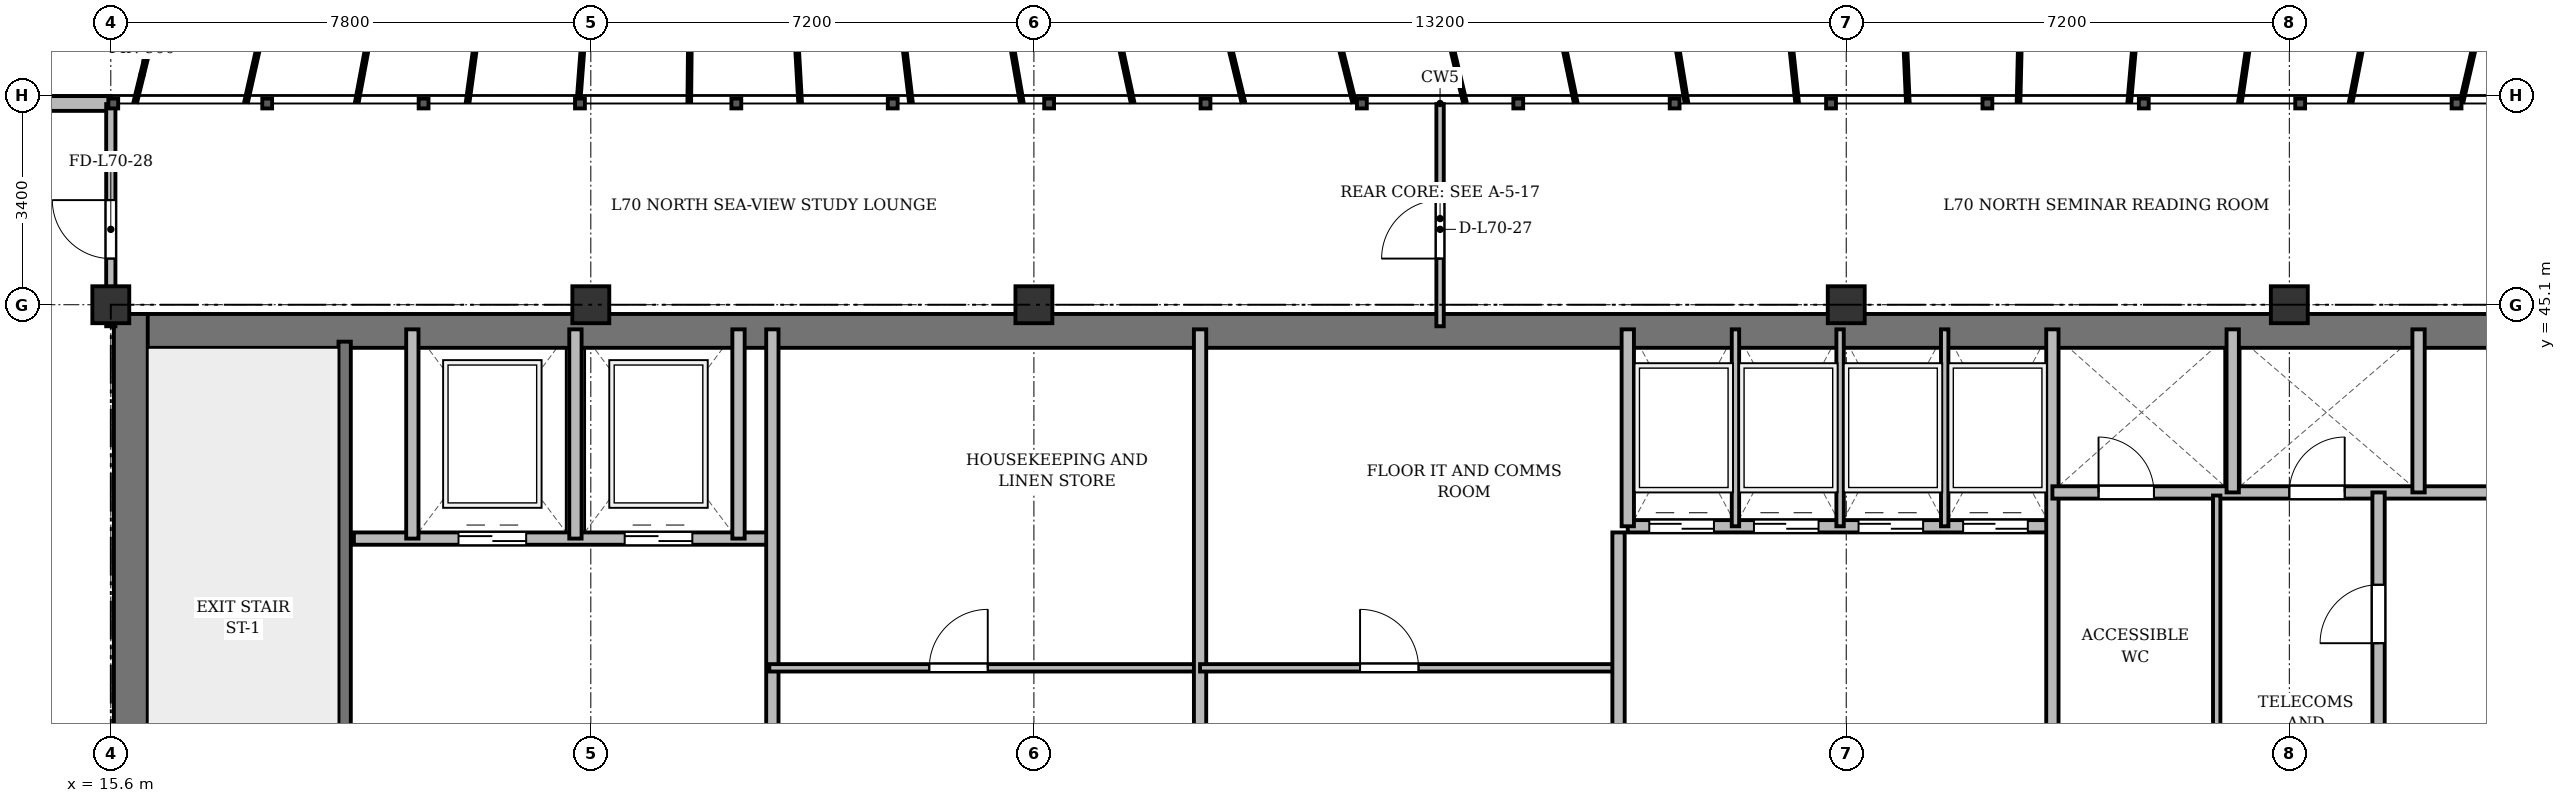
"""IFC4 building model, lengths in metres.
Left out: names, types, materials, properties, quantities, classifications, styles, units other than length and angle.
Written with IfcOpenShell. Run it as: python <this file> out.ifc"""

import sys

from ifc_helpers import new_model, si_unit, direction, frame, frame_2d, origin, origin_2d, place, context, subcontext, project, spatial, rectangle, extrude, source, transform, mapped, element, fill, save


model = new_model("IFC4")
c1 = context("Model", 3, precision=1e-05, world=origin(), true_north=direction((0.0, 1.0)))
c2 = subcontext(c1, "Body", "Model", "MODEL_VIEW")
j1 = project(units=[si_unit("LENGTHUNIT", "METRE"), si_unit("PLANEANGLEUNIT", "RADIAN")], contexts=[c1])
p1 = place(None, origin())
s1 = spatial("IfcSite", under=j1, at=p1, CompositionType="ELEMENT")
p2 = place(p1, origin())
s2 = spatial("IfcBuilding", under=s1, at=p2, CompositionType="ELEMENT")
p3 = place(p2, frame((0.0, 0.0, 270.3)))
s3 = spatial("IfcBuildingStorey", under=s2, at=p3, CompositionType="ELEMENT", Elevation=270.3)
m1 = source(origin(), c2, "Body", "SweptSolid", [
    extrude(rectangle(XDim=0.6, YDim=0.6, at=origin_2d()), origin(), (0.0, 0.0, 1.0), 3.6),
])
for number, where, z_axis, x_axis in (
    (1, (15.6, 45.1, 0.0), (0.0, 0.0, 1.0), (1.0, 0.0, 0.0)),
    (2, (23.4, 45.1, 0.0), (0.0, 0.0, 1.0), (1.0, 0.0, 0.0)),
    (3, (30.6, 45.1, 0.0), (0.0, 0.0, 1.0), (1.0, 0.0, 0.0)),
    (4, (43.8, 45.1, 0.0), (0.0, 0.0, 1.0), (1.0, 0.0, 0.0)),
    (5, (51.0, 45.1, 0.0), (0.0, 0.0, 1.0), (1.0, 0.0, 0.0)),
):
    element("IfcColumn", number, at=place(p3, frame(where, z_axis=z_axis, x_axis=x_axis)), inside=s3, PredefinedType="COLUMN", context=c2, shape_type="MappedRepresentation", body=[
        mapped(m1, transform((0.0, 0.0, 0.0), x_axis=(1.0, 0.0, 0.0), y_axis=(0.0, 1.0, 0.0), z_axis=(0.0, 0.0, 1.0), scale=1.0)),
    ])
p4 = place(p3, frame((11.3, 48.37, 0.0), z_axis=(0.0, 0.0, 1.0), x_axis=(1.0, 0.0, 0.0)))
e6 = element("IfcWall", 6, at=p4, inside=s3, PredefinedType="SOLIDWALL", context=c2, shape_type="SweptSolid", body=[
    extrude(rectangle(XDim=4.3, YDim=0.24, at=frame_2d((2.15, 0.0))), origin(), (0.0, 0.0, 1.0), 3.37),
])
p5 = place(p4, frame((1.46, 0.0, 0.9)))
e7 = element("IfcOpeningElement", 7, at=p5, cuts=e6, PredefinedType="OPENING", context=c2, shape_type="SweptSolid", body=[
    extrude(rectangle(XDim=1.2, YDim=1.65, at=frame_2d((0.6, 0.825))), frame((0.0, 0.13, 0.0), z_axis=(0.0, -1.0, 0.0), x_axis=(1.0, 0.0, 0.0)), (0.0, 0.0, 1.0), 0.26),
])
p6 = place(p3, frame((15.65, 44.675, 0.0), z_axis=(0.0, 0.0, 1.0), x_axis=(1.0, 0.0, 0.0)))
e8 = element("IfcWall", 8, at=p6, inside=s3, PredefinedType="SHEAR", context=c2, shape_type="SweptSolid", body=[
    extrude(rectangle(XDim=43.1, YDim=0.55, at=frame_2d((21.55, 0.0))), origin(), (0.0, 0.0, 1.0), 3.37),
])
p7 = place(p3, frame((15.925, 33.4, 0.0), z_axis=(0.0, 0.0, 1.0), x_axis=(0.0, 1.0, 0.0)))
e9 = element("IfcWall", 9, at=p7, inside=s3, PredefinedType="SHEAR", context=c2, shape_type="SweptSolid", body=[
    extrude(rectangle(XDim=11.55, YDim=0.55, at=frame_2d((5.775, 0.0))), origin(), (0.0, 0.0, 1.0), 3.37),
])
p8 = place(p3, frame((19.4, 33.4, 0.0), z_axis=(0.0, 0.0, 1.0), x_axis=(0.0, 1.0, 0.0)))
e10 = element("IfcWall", 10, at=p8, inside=s3, PredefinedType="SHEAR", context=c2, shape_type="SweptSolid", body=[
    extrude(rectangle(XDim=11.1, YDim=0.2, at=frame_2d((5.55, 0.0))), origin(), (0.0, 0.0, 1.0), 3.37),
])
p9 = place(p8, frame((0.85, 0.0, 0.0)))
e11 = element("IfcOpeningElement", 11, at=p9, cuts=e10, PredefinedType="OPENING", context=c2, shape_type="SweptSolid", body=[
    extrude(rectangle(XDim=1.1, YDim=2.15, at=frame_2d((0.55, 1.075))), frame((0.0, 0.11, 0.0), z_axis=(0.0, -1.0, 0.0), x_axis=(1.0, 0.0, 0.0)), (0.0, 0.0, 1.0), 0.22),
])
p10 = place(p3, frame((19.55, 41.3, 0.0), z_axis=(0.0, 0.0, 1.0), x_axis=(1.0, 0.0, 0.0)))
e12 = element("IfcWall", 12, at=p10, inside=s3, PredefinedType="SOLIDWALL", context=c2, shape_type="SweptSolid", body=[
    extrude(rectangle(XDim=6.75, YDim=0.2, at=frame_2d((3.375, 0.0))), origin(), (0.0, 0.0, 1.0), 3.37),
])
p11 = place(p10, frame((1.7, 0.0, 0.0)))
e13 = element("IfcOpeningElement", 13, at=p11, cuts=e12, PredefinedType="OPENING", context=c2, shape_type="SweptSolid", body=[
    extrude(rectangle(XDim=1.1, YDim=2.15, at=frame_2d((0.55, 1.075))), frame((0.0, 0.11, 0.0), z_axis=(0.0, -1.0, 0.0), x_axis=(1.0, 0.0, 0.0)), (0.0, 0.0, 1.0), 0.22),
])
p12 = place(p10, frame((4.4, 0.0, 0.0)))
e14 = element("IfcOpeningElement", 14, at=p12, cuts=e12, PredefinedType="OPENING", context=c2, shape_type="SweptSolid", body=[
    extrude(rectangle(XDim=1.1, YDim=2.15, at=frame_2d((0.55, 1.075))), frame((0.0, 0.11, 0.0), z_axis=(0.0, -1.0, 0.0), x_axis=(1.0, 0.0, 0.0)), (0.0, 0.0, 1.0), 0.22),
])
for number, where, z_axis, x_axis in (
    (15, (20.5, 41.3, 0.0), (0.0, 0.0, 1.0), (0.0, 1.0, 0.0)),
    (16, (23.15, 41.3, 0.0), (0.0, 0.0, 1.0), (0.0, 1.0, 0.0)),
    (17, (25.8, 41.3, 0.0), (0.0, 0.0, 1.0), (0.0, 1.0, 0.0)),
):
    element("IfcWall", number, at=place(p3, frame(where, z_axis=z_axis, x_axis=x_axis)), inside=s3, PredefinedType="SOLIDWALL", context=c2, shape_type="SweptSolid", body=[
        extrude(rectangle(XDim=3.4, YDim=0.2, at=frame_2d((1.7, 0.0))), origin(), (0.0, 0.0, 1.0), 3.37),
    ])
p13 = place(p3, frame((26.35, 33.4, 0.0), z_axis=(0.0, 0.0, 1.0), x_axis=(0.0, 1.0, 0.0)))
e18 = element("IfcWall", 18, at=p13, inside=s3, PredefinedType="SOLIDWALL", context=c2, shape_type="SweptSolid", body=[
    extrude(rectangle(XDim=11.3, YDim=0.2, at=frame_2d((5.65, 0.0))), origin(), (0.0, 0.0, 1.0), 2.92),
])
p14 = place(p3, frame((26.3, 39.2, 0.0), z_axis=(0.0, 0.0, 1.0), x_axis=(1.0, 0.0, 0.0)))
e19 = element("IfcWall", 19, at=p14, inside=s3, PredefinedType="PARTITIONING", context=c2, shape_type="SweptSolid", body=[
    extrude(rectangle(XDim=7.0, YDim=0.12, at=frame_2d((3.5, 0.0))), origin(), (0.0, 0.0, 1.0), 2.87),
])
p15 = place(p14, frame((2.6, 0.0, 0.0)))
e20 = element("IfcOpeningElement", 20, at=p15, cuts=e19, PredefinedType="OPENING", context=c2, shape_type="SweptSolid", body=[
    extrude(rectangle(XDim=0.95, YDim=2.15, at=frame_2d((0.475, 1.075))), frame((0.0, 0.07, 0.0), z_axis=(0.0, -1.0, 0.0), x_axis=(1.0, 0.0, 0.0)), (0.0, 0.0, 1.0), 0.14),
])
p16 = place(p3, frame((33.3, 33.4, 0.0), z_axis=(0.0, 0.0, 1.0), x_axis=(0.0, 1.0, 0.0)))
e21 = element("IfcWall", 21, at=p16, inside=s3, PredefinedType="SOLIDWALL", context=c2, shape_type="SweptSolid", body=[
    extrude(rectangle(XDim=11.3, YDim=0.2, at=frame_2d((5.65, 0.0))), origin(), (0.0, 0.0, 1.0), 2.92),
])
p17 = place(p3, frame((33.3, 39.2, 0.0), z_axis=(0.0, 0.0, 1.0), x_axis=(1.0, 0.0, 0.0)))
e22 = element("IfcWall", 22, at=p17, inside=s3, PredefinedType="PARTITIONING", context=c2, shape_type="SweptSolid", body=[
    extrude(rectangle(XDim=6.8, YDim=0.12, at=frame_2d((3.4, 0.0))), origin(), (0.0, 0.0, 1.0), 3.37),
])
p18 = place(p17, frame((2.6, 0.0, 0.0)))
e23 = element("IfcOpeningElement", 23, at=p18, cuts=e22, PredefinedType="OPENING", context=c2, shape_type="SweptSolid", body=[
    extrude(rectangle(XDim=0.95, YDim=2.15, at=frame_2d((0.475, 1.075))), frame((0.0, 0.07, 0.0), z_axis=(0.0, -1.0, 0.0), x_axis=(1.0, 0.0, 0.0)), (0.0, 0.0, 1.0), 0.14),
])
p19 = place(p3, frame((40.1, 33.4, 0.0), z_axis=(0.0, 0.0, 1.0), x_axis=(0.0, 1.0, 0.0)))
e24 = element("IfcWall", 24, at=p19, inside=s3, PredefinedType="SOLIDWALL", context=c2, shape_type="SweptSolid", body=[
    extrude(rectangle(XDim=8.0, YDim=0.2, at=frame_2d((4.0, 0.0))), origin(), (0.0, 0.0, 1.0), 2.92),
])
p20 = place(p3, frame((40.25, 41.5, 0.0), z_axis=(0.0, 0.0, 1.0), x_axis=(1.0, 0.0, 0.0)))
e25 = element("IfcWall", 25, at=p20, inside=s3, PredefinedType="SOLIDWALL", context=c2, shape_type="SweptSolid", body=[
    extrude(rectangle(XDim=6.9, YDim=0.2, at=frame_2d((3.45, 0.0))), origin(), (0.0, 0.0, 1.0), 3.37),
])
p21 = place(p20, frame((0.35, 0.0, 0.0)))
e26 = element("IfcOpeningElement", 26, at=p21, cuts=e25, PredefinedType="OPENING", context=c2, shape_type="SweptSolid", body=[
    extrude(rectangle(XDim=1.05, YDim=2.15, at=frame_2d((0.525, 1.075))), frame((0.0, 0.11, 0.0), z_axis=(0.0, -1.0, 0.0), x_axis=(1.0, 0.0, 0.0)), (0.0, 0.0, 1.0), 0.22),
])
p22 = place(p20, frame((2.05, 0.0, 0.0)))
e27 = element("IfcOpeningElement", 27, at=p22, cuts=e25, PredefinedType="OPENING", context=c2, shape_type="SweptSolid", body=[
    extrude(rectangle(XDim=1.05, YDim=2.15, at=frame_2d((0.525, 1.075))), frame((0.0, 0.11, 0.0), z_axis=(0.0, -1.0, 0.0), x_axis=(1.0, 0.0, 0.0)), (0.0, 0.0, 1.0), 0.22),
])
p23 = place(p20, frame((3.75, 0.0, 0.0)))
e28 = element("IfcOpeningElement", 28, at=p23, cuts=e25, PredefinedType="OPENING", context=c2, shape_type="SweptSolid", body=[
    extrude(rectangle(XDim=1.05, YDim=2.15, at=frame_2d((0.525, 1.075))), frame((0.0, 0.11, 0.0), z_axis=(0.0, -1.0, 0.0), x_axis=(1.0, 0.0, 0.0)), (0.0, 0.0, 1.0), 0.22),
])
p24 = place(p20, frame((5.45, 0.0, 0.0)))
e29 = element("IfcOpeningElement", 29, at=p24, cuts=e25, PredefinedType="OPENING", context=c2, shape_type="SweptSolid", body=[
    extrude(rectangle(XDim=1.05, YDim=2.15, at=frame_2d((0.525, 1.075))), frame((0.0, 0.11, 0.0), z_axis=(0.0, -1.0, 0.0), x_axis=(1.0, 0.0, 0.0)), (0.0, 0.0, 1.0), 0.22),
])
p25 = place(p3, frame((40.25, 41.5, 0.0), z_axis=(0.0, 0.0, 1.0), x_axis=(0.0, 1.0, 0.0)))
e30 = element("IfcWall", 30, at=p25, inside=s3, PredefinedType="SOLIDWALL", context=c2, shape_type="SweptSolid", body=[
    extrude(rectangle(XDim=3.2, YDim=0.2, at=frame_2d((1.6, 0.0))), origin(), (0.0, 0.0, 1.0), 3.37),
])
for number, where, z_axis, x_axis in (
    (31, (42.0, 41.5, 0.0), (0.0, 0.0, 1.0), (0.0, 1.0, 0.0)),
    (32, (43.7, 41.5, 0.0), (0.0, 0.0, 1.0), (0.0, 1.0, 0.0)),
    (33, (45.4, 41.5, 0.0), (0.0, 0.0, 1.0), (0.0, 1.0, 0.0)),
):
    element("IfcWall", number, at=place(p3, frame(where, z_axis=z_axis, x_axis=x_axis)), inside=s3, PredefinedType="PARTITIONING", context=c2, shape_type="SweptSolid", body=[
        extrude(rectangle(XDim=3.2, YDim=0.12, at=frame_2d((1.6, 0.0))), origin(), (0.0, 0.0, 1.0), 3.37),
    ])
p26 = place(p3, frame((47.15, 33.4, 0.0), z_axis=(0.0, 0.0, 1.0), x_axis=(0.0, 1.0, 0.0)))
e34 = element("IfcWall", 34, at=p26, inside=s3, PredefinedType="SOLIDWALL", context=c2, shape_type="SweptSolid", body=[
    extrude(rectangle(XDim=11.3, YDim=0.2, at=frame_2d((5.65, 0.0))), origin(), (0.0, 0.0, 1.0), 2.92),
])
p27 = place(p3, frame((47.15, 42.05, 0.0), z_axis=(0.0, 0.0, 1.0), x_axis=(1.0, 0.0, 0.0)))
e35 = element("IfcWall", 35, at=p27, inside=s3, PredefinedType="SOLIDWALL", context=c2, shape_type="SweptSolid", body=[
    extrude(rectangle(XDim=7.85, YDim=0.2, at=frame_2d((3.925, 0.0))), origin(), (0.0, 0.0, 1.0), 2.87),
])
p28 = place(p27, frame((0.75, 0.0, 0.0)))
e36 = element("IfcOpeningElement", 36, at=p28, cuts=e35, PredefinedType="OPENING", context=c2, shape_type="SweptSolid", body=[
    extrude(rectangle(XDim=0.9, YDim=2.1, at=frame_2d((0.45, 1.05))), frame((0.0, 0.11, 0.0), z_axis=(0.0, -1.0, 0.0), x_axis=(1.0, 0.0, 0.0)), (0.0, 0.0, 1.0), 0.22),
])
p29 = place(p27, frame((3.85, 0.0, 0.0)))
e37 = element("IfcOpeningElement", 37, at=p29, cuts=e35, PredefinedType="OPENING", context=c2, shape_type="SweptSolid", body=[
    extrude(rectangle(XDim=0.9, YDim=2.1, at=frame_2d((0.45, 1.05))), frame((0.0, 0.11, 0.0), z_axis=(0.0, -1.0, 0.0), x_axis=(1.0, 0.0, 0.0)), (0.0, 0.0, 1.0), 0.22),
])
for number, where, z_axis, x_axis in (
    (38, (50.08, 42.05, 0.0), (0.0, 0.0, 1.0), (0.0, 1.0, 0.0)),
    (39, (53.1, 42.05, 0.0), (0.0, 0.0, 1.0), (0.0, 1.0, 0.0)),
):
    element("IfcWall", number, at=place(p3, frame(where, z_axis=z_axis, x_axis=x_axis)), inside=s3, PredefinedType="SOLIDWALL", context=c2, shape_type="SweptSolid", body=[
        extrude(rectangle(XDim=2.65, YDim=0.2, at=frame_2d((1.325, 0.0))), origin(), (0.0, 0.0, 1.0), 3.37),
    ])
p30 = place(p3, frame((52.45, 33.4, 0.0), z_axis=(0.0, 0.0, 1.0), x_axis=(0.0, 1.0, 0.0)))
e40 = element("IfcWall", 40, at=p30, inside=s3, PredefinedType="PARTITIONING", context=c2, shape_type="SweptSolid", body=[
    extrude(rectangle(XDim=8.65, YDim=0.2, at=frame_2d((4.325, 0.0))), origin(), (0.0, 0.0, 1.0), 2.92),
])
p31 = place(p30, frame((6.2, 0.0, 0.0)))
e41 = element("IfcOpeningElement", 41, at=p31, cuts=e40, PredefinedType="OPENING", context=c2, shape_type="SweptSolid", body=[
    extrude(rectangle(XDim=0.95, YDim=2.15, at=frame_2d((0.475, 1.075))), frame((0.0, 0.11, 0.0), z_axis=(0.0, -1.0, 0.0), x_axis=(1.0, 0.0, 0.0)), (0.0, 0.0, 1.0), 0.22),
])
p32 = place(p3, frame((49.82, 36.18, 0.0), z_axis=(0.0, 0.0, 1.0), x_axis=(0.0, 1.0, 0.0)))
e42 = element("IfcWall", 42, at=p32, inside=s3, PredefinedType="PARTITIONING", context=c2, shape_type="SweptSolid", body=[
    extrude(rectangle(XDim=5.82, YDim=0.12, at=frame_2d((2.91, 0.0))), origin(), (0.0, 0.0, 1.0), 3.37),
])
p33 = place(p3, frame((37.2, 44.75, 0.0), z_axis=(0.0, 0.0, 1.0), x_axis=(0.0, 1.0, 0.0)))
e43 = element("IfcWall", 43, at=p33, inside=s3, PredefinedType="PARTITIONING", context=c2, shape_type="SweptSolid", body=[
    extrude(rectangle(XDim=3.61, YDim=0.12, at=frame_2d((1.805, 0.0))), origin(), (0.0, 0.0, 1.0), 2.92),
])
p34 = place(p33, frame((1.1, 0.0, 0.0)))
e44 = element("IfcOpeningElement", 44, at=p34, cuts=e43, PredefinedType="OPENING", context=c2, shape_type="SweptSolid", body=[
    extrude(rectangle(XDim=0.95, YDim=2.15, at=frame_2d((0.475, 1.075))), frame((0.0, 0.07, 0.0), z_axis=(0.0, -1.0, 0.0), x_axis=(1.0, 0.0, 0.0)), (0.0, 0.0, 1.0), 0.14),
])
p35 = place(p3, frame((15.6, 44.75, 0.0), z_axis=(0.0, 0.0, 1.0), x_axis=(0.0, 1.0, 0.0)))
e45 = element("IfcWall", 45, at=p35, inside=s3, PredefinedType="PARTITIONING", context=c2, shape_type="SweptSolid", body=[
    extrude(rectangle(XDim=3.61, YDim=0.15, at=frame_2d((1.805, 0.0))), origin(), (0.0, 0.0, 1.0), 2.87),
])
p36 = place(p35, frame((1.1, 0.0, 0.0)))
e46 = element("IfcOpeningElement", 46, at=p36, cuts=e45, PredefinedType="OPENING", context=c2, shape_type="SweptSolid", body=[
    extrude(rectangle(XDim=0.95, YDim=2.15, at=frame_2d((0.475, 1.075))), frame((0.0, 0.085, 0.0), z_axis=(0.0, -1.0, 0.0), x_axis=(1.0, 0.0, 0.0)), (0.0, 0.0, 1.0), 0.17),
])
m2 = source(origin(), c2, "Body", "SweptSolid", [
    extrude(rectangle(XDim=1.1, YDim=2.15, at=frame_2d((0.55, 1.075))), frame((0.0, 0.025, 0.0), z_axis=(0.0, -1.0, 0.0), x_axis=(1.0, 0.0, 0.0)), (0.0, 0.0, 1.0), 0.05),
])
p37 = place(p11, origin())
e47 = element("IfcDoor", 47, at=p37, inside=s3, OperationType="DOUBLE_DOOR_SLIDING", PredefinedType="DOOR", context=c2, shape_type="MappedRepresentation", body=[
    mapped(m2, transform((0.0, 0.0, 0.0), x_axis=(1.0, 0.0, 0.0), y_axis=(0.0, 1.0, 0.0), z_axis=(0.0, 0.0, 1.0), scale=1.0)),
])
fill(e13, e47)
p38 = place(p12, origin())
e48 = element("IfcDoor", 48, at=p38, inside=s3, OperationType="DOUBLE_DOOR_SLIDING", PredefinedType="DOOR", context=c2, shape_type="MappedRepresentation", body=[
    mapped(m2, transform((0.0, 0.0, 0.0), x_axis=(1.0, 0.0, 0.0), y_axis=(0.0, 1.0, 0.0), z_axis=(0.0, 0.0, 1.0), scale=1.0)),
])
fill(e14, e48)
m3 = source(origin(), c2, "Body", "SweptSolid", [
    extrude(rectangle(XDim=0.95, YDim=2.15, at=frame_2d((0.475, 1.075))), frame((0.0, 0.025, 0.0), z_axis=(0.0, -1.0, 0.0), x_axis=(1.0, 0.0, 0.0)), (0.0, 0.0, 1.0), 0.05),
])
p39 = place(p15, origin())
e49 = element("IfcDoor", 49, at=p39, inside=s3, OperationType="SINGLE_SWING_RIGHT", PredefinedType="DOOR", context=c2, shape_type="MappedRepresentation", body=[
    mapped(m3, transform((0.0, 0.0, 0.0), x_axis=(1.0, 0.0, 0.0), y_axis=(0.0, 1.0, 0.0), z_axis=(0.0, 0.0, 1.0), scale=1.0)),
])
fill(e20, e49)
p40 = place(p18, origin())
e50 = element("IfcDoor", 50, at=p40, inside=s3, OperationType="SINGLE_SWING_LEFT", PredefinedType="DOOR", context=c2, shape_type="MappedRepresentation", body=[
    mapped(m3, transform((0.0, 0.0, 0.0), x_axis=(1.0, 0.0, 0.0), y_axis=(0.0, 1.0, 0.0), z_axis=(0.0, 0.0, 1.0), scale=1.0)),
])
fill(e23, e50)
m4 = source(origin(), c2, "Body", "SweptSolid", [
    extrude(rectangle(XDim=1.05, YDim=2.15, at=frame_2d((0.525, 1.075))), frame((0.0, 0.025, 0.0), z_axis=(0.0, -1.0, 0.0), x_axis=(1.0, 0.0, 0.0)), (0.0, 0.0, 1.0), 0.05),
])
p41 = place(p21, origin())
e51 = element("IfcDoor", 51, at=p41, inside=s3, OperationType="DOUBLE_DOOR_SLIDING", PredefinedType="DOOR", context=c2, shape_type="MappedRepresentation", body=[
    mapped(m4, transform((0.0, 0.0, 0.0), x_axis=(1.0, 0.0, 0.0), y_axis=(0.0, 1.0, 0.0), z_axis=(0.0, 0.0, 1.0), scale=1.0)),
])
fill(e26, e51)
p42 = place(p22, origin())
e52 = element("IfcDoor", 52, at=p42, inside=s3, OperationType="DOUBLE_DOOR_SLIDING", PredefinedType="DOOR", context=c2, shape_type="MappedRepresentation", body=[
    mapped(m4, transform((0.0, 0.0, 0.0), x_axis=(1.0, 0.0, 0.0), y_axis=(0.0, 1.0, 0.0), z_axis=(0.0, 0.0, 1.0), scale=1.0)),
])
fill(e27, e52)
p43 = place(p23, origin())
e53 = element("IfcDoor", 53, at=p43, inside=s3, OperationType="DOUBLE_DOOR_SLIDING", PredefinedType="DOOR", context=c2, shape_type="MappedRepresentation", body=[
    mapped(m4, transform((0.0, 0.0, 0.0), x_axis=(1.0, 0.0, 0.0), y_axis=(0.0, 1.0, 0.0), z_axis=(0.0, 0.0, 1.0), scale=1.0)),
])
fill(e28, e53)
p44 = place(p24, origin())
e54 = element("IfcDoor", 54, at=p44, inside=s3, OperationType="DOUBLE_DOOR_SLIDING", PredefinedType="DOOR", context=c2, shape_type="MappedRepresentation", body=[
    mapped(m4, transform((0.0, 0.0, 0.0), x_axis=(1.0, 0.0, 0.0), y_axis=(0.0, 1.0, 0.0), z_axis=(0.0, 0.0, 1.0), scale=1.0)),
])
fill(e29, e54)
m5 = source(origin(), c2, "Body", "SweptSolid", [
    extrude(rectangle(XDim=0.9, YDim=2.1, at=frame_2d((0.45, 1.05))), frame((0.0, 0.025, 0.0), z_axis=(0.0, -1.0, 0.0), x_axis=(1.0, 0.0, 0.0)), (0.0, 0.0, 1.0), 0.05),
])
p45 = place(p28, origin())
e55 = element("IfcDoor", 55, at=p45, inside=s3, OperationType="SINGLE_SWING_LEFT", PredefinedType="DOOR", context=c2, shape_type="MappedRepresentation", body=[
    mapped(m5, transform((0.0, 0.0, 0.0), x_axis=(1.0, 0.0, 0.0), y_axis=(0.0, 1.0, 0.0), z_axis=(0.0, 0.0, 1.0), scale=1.0)),
])
fill(e36, e55)
p46 = place(p29, origin())
e56 = element("IfcDoor", 56, at=p46, inside=s3, OperationType="SINGLE_SWING_RIGHT", PredefinedType="DOOR", context=c2, shape_type="MappedRepresentation", body=[
    mapped(m5, transform((0.0, 0.0, 0.0), x_axis=(1.0, 0.0, 0.0), y_axis=(0.0, 1.0, 0.0), z_axis=(0.0, 0.0, 1.0), scale=1.0)),
])
fill(e37, e56)
p47 = place(p31, origin())
e57 = element("IfcDoor", 57, at=p47, inside=s3, OperationType="SINGLE_SWING_LEFT", PredefinedType="DOOR", context=c2, shape_type="MappedRepresentation", body=[
    mapped(m3, transform((0.0, 0.0, 0.0), x_axis=(1.0, 0.0, 0.0), y_axis=(0.0, 1.0, 0.0), z_axis=(0.0, 0.0, 1.0), scale=1.0)),
])
fill(e41, e57)
p48 = place(p34, origin())
e58 = element("IfcDoor", 58, at=p48, inside=s3, OperationType="SINGLE_SWING_LEFT", PredefinedType="DOOR", context=c2, shape_type="MappedRepresentation", body=[
    mapped(m3, transform((0.0, 0.0, 0.0), x_axis=(1.0, 0.0, 0.0), y_axis=(0.0, 1.0, 0.0), z_axis=(0.0, 0.0, 1.0), scale=1.0)),
])
fill(e44, e58)
p49 = place(p36, origin())
e59 = element("IfcDoor", 59, at=p49, inside=s3, OperationType="SINGLE_SWING_RIGHT", PredefinedType="DOOR", context=c2, shape_type="MappedRepresentation", body=[
    mapped(m3, transform((0.0, 0.0, 0.0), x_axis=(1.0, 0.0, 0.0), y_axis=(0.0, 1.0, 0.0), z_axis=(0.0, 0.0, 1.0), scale=1.0)),
])
fill(e46, e59)
save(model, sys.argv[1])
